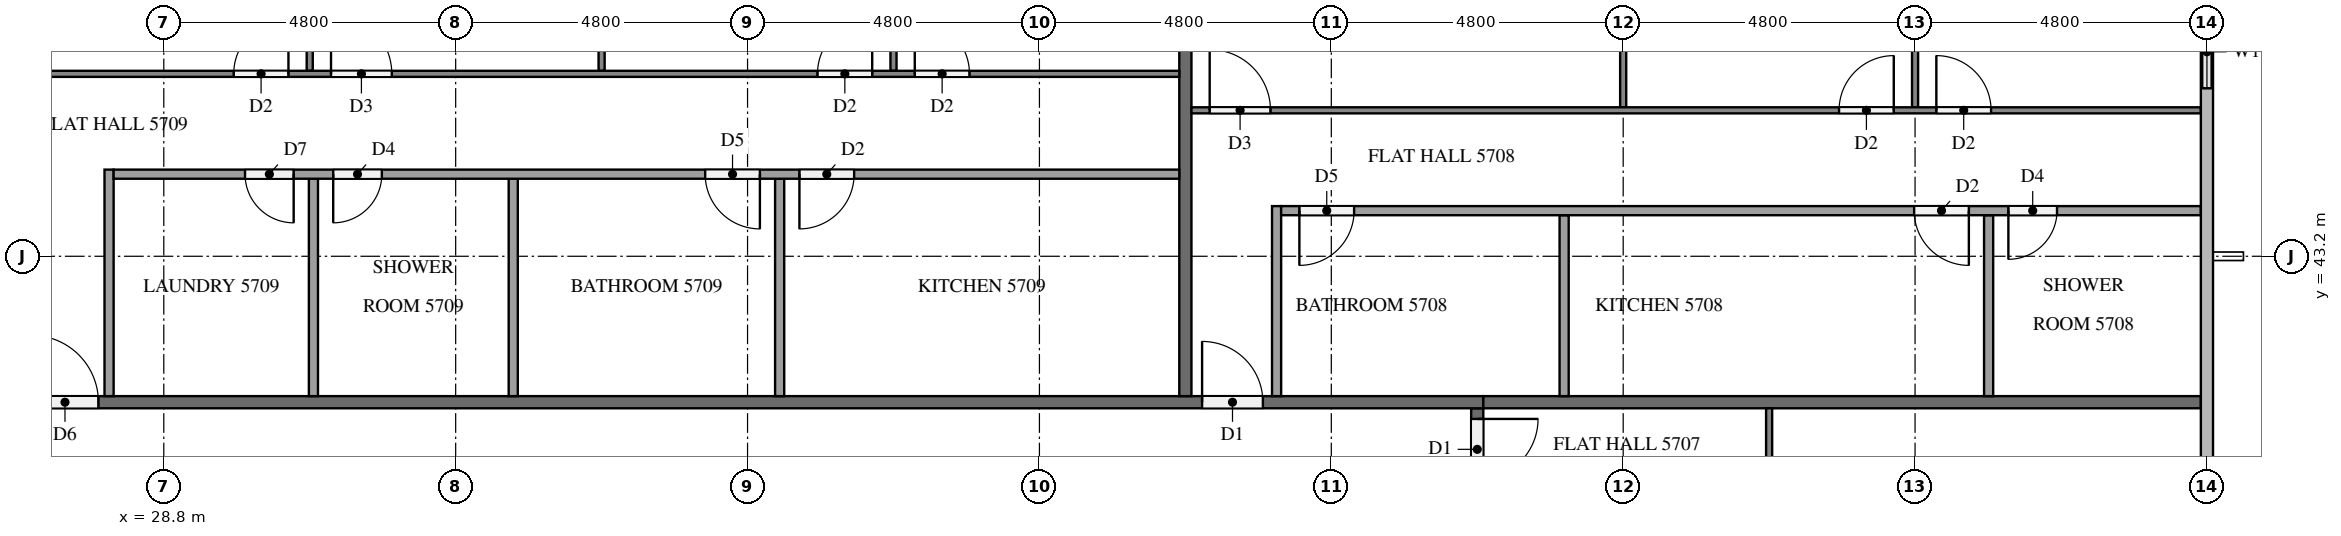
"""IFC4 building model, lengths in metres.
Left out: names, types, materials, properties, quantities, classifications, styles, units other than length and angle.
Written with IfcOpenShell. Run it as: python <this file> out.ifc"""

import sys

from ifc_helpers import new_model, si_unit, direction, frame, frame_2d, origin, place, context, subcontext, project, spatial, rectangle, extrude, element, fill, save


model = new_model("IFC4")
c1 = context("Model", 3, precision=1e-05, world=origin(), true_north=direction((0.0, 1.0)))
c2 = subcontext(c1, "Body", "Model", "MODEL_VIEW")
j1 = project(units=[si_unit("LENGTHUNIT", "METRE"), si_unit("PLANEANGLEUNIT", "RADIAN")], contexts=[c1])
p1 = place(None, origin())
s1 = spatial("IfcSite", under=j1, at=p1, CompositionType="ELEMENT")
p2 = place(p1, origin())
s2 = spatial("IfcBuilding", under=s1, at=p2, CompositionType="ELEMENT")
p3 = place(p2, frame((0.0, 0.0, 219.3)))
s3 = spatial("IfcBuildingStorey", under=s2, at=p3, CompositionType="ELEMENT", Elevation=219.3)
p4 = place(p3, frame((62.4, 45.6, 0.0), z_axis=(0.0, 0.0, 1.0), x_axis=(0.0, 1.0, 0.0)))
e1 = element("IfcWall", 1, at=p4, inside=s3, PredefinedType="SOLIDWALL", context=c2, shape_type="SweptSolid", body=[
    extrude(rectangle(XDim=1.925, YDim=0.15, at=frame_2d((0.962, 0.0))), origin(), (0.0, 0.0, 1.0), 3.2),
])
p5 = place(p4, frame((0.363, 0.0, 0.9)))
e2 = element("IfcOpeningElement", 2, at=p5, cuts=e1, PredefinedType="OPENING", context=c2, shape_type="SweptSolid", body=[
    extrude(rectangle(XDim=1.2, YDim=1.4, at=frame_2d((0.6, 0.7))), frame((0.0, 0.085, 0.0), z_axis=(0.0, -1.0, 0.0), x_axis=(1.0, 0.0, 0.0)), (0.0, 0.0, 1.0), 0.17),
])
p6 = place(p3, frame((50.4, 40.7, 0.0), z_axis=(0.0, 0.0, 1.0), x_axis=(0.0, -1.0, 0.0)))
e3 = element("IfcWall", 3, at=p6, inside=s3, PredefinedType="PARTITIONING", context=c2, shape_type="SweptSolid", body=[
    extrude(rectangle(XDim=28.6, YDim=0.2, at=frame_2d((14.3, 0.0))), origin(), (0.0, 0.0, 1.0), 3.2),
])
p7 = place(p6, frame((21.775, 0.0, 0.0)))
e4 = element("IfcOpeningElement", 4, at=p7, cuts=e3, PredefinedType="OPENING", context=c2, shape_type="SweptSolid", body=[
    extrude(rectangle(XDim=1.0, YDim=2.1, at=frame_2d((0.5, 1.05))), frame((0.0, 0.11, 0.0), z_axis=(0.0, -1.0, 0.0), x_axis=(1.0, 0.0, 0.0)), (0.0, 0.0, 1.0), 0.22),
])
p8 = place(p6, frame((7.375, 0.0, 0.0)))
e5 = element("IfcOpeningElement", 5, at=p8, cuts=e3, PredefinedType="OPENING", context=c2, shape_type="SweptSolid", body=[
    extrude(rectangle(XDim=1.0, YDim=2.1, at=frame_2d((0.5, 1.05))), frame((0.0, 0.11, 0.0), z_axis=(0.0, -1.0, 0.0), x_axis=(1.0, 0.0, 0.0)), (0.0, 0.0, 1.0), 0.22),
])
p9 = place(p6, frame((0.175, 0.0, 0.0)))
e6 = element("IfcOpeningElement", 6, at=p9, cuts=e3, PredefinedType="OPENING", context=c2, shape_type="SweptSolid", body=[
    extrude(rectangle(XDim=1.0, YDim=2.1, at=frame_2d((0.5, 1.05))), frame((0.0, 0.11, 0.0), z_axis=(0.0, -1.0, 0.0), x_axis=(1.0, 0.0, 0.0)), (0.0, 0.0, 1.0), 0.22),
])
p10 = place(p3, frame((11.9, 40.8, 0.0), z_axis=(0.0, 0.0, 1.0), x_axis=(1.0, 0.0, 0.0)))
e7 = element("IfcWall", 7, at=p10, inside=s3, PredefinedType="PARTITIONING", context=c2, shape_type="SweptSolid", body=[
    extrude(rectangle(XDim=38.6, YDim=0.2, at=frame_2d((19.3, 0.0))), origin(), (0.0, 0.0, 1.0), 3.2),
])
p11 = place(p10, frame((33.975, 0.0, 0.0)))
e8 = element("IfcOpeningElement", 8, at=p11, cuts=e7, PredefinedType="OPENING", context=c2, shape_type="SweptSolid", body=[
    extrude(rectangle(XDim=1.0, YDim=2.1, at=frame_2d((0.5, 1.05))), frame((0.0, 0.11, 0.0), z_axis=(0.0, -1.0, 0.0), x_axis=(1.0, 0.0, 0.0)), (0.0, 0.0, 1.0), 0.22),
])
p12 = place(p10, frame((14.725, 0.0, 0.0)))
e9 = element("IfcOpeningElement", 9, at=p12, cuts=e7, PredefinedType="OPENING", context=c2, shape_type="SweptSolid", body=[
    extrude(rectangle(XDim=1.1, YDim=2.1, at=frame_2d((0.55, 1.05))), frame((0.0, 0.11, 0.0), z_axis=(0.0, -1.0, 0.0), x_axis=(1.0, 0.0, 0.0)), (0.0, 0.0, 1.0), 0.22),
])
p13 = place(p10, frame((7.575, 0.0, 0.0)))
e10 = element("IfcOpeningElement", 10, at=p13, cuts=e7, PredefinedType="OPENING", context=c2, shape_type="SweptSolid", body=[
    extrude(rectangle(XDim=1.0, YDim=2.1, at=frame_2d((0.5, 1.05))), frame((0.0, 0.11, 0.0), z_axis=(0.0, -1.0, 0.0), x_axis=(1.0, 0.0, 0.0)), (0.0, 0.0, 1.0), 0.22),
])
p14 = place(p10, frame((6.025, 0.0, 0.0)))
e11 = element("IfcOpeningElement", 11, at=p14, cuts=e7, PredefinedType="OPENING", context=c2, shape_type="SweptSolid", body=[
    extrude(rectangle(XDim=1.0, YDim=2.1, at=frame_2d((0.5, 1.05))), frame((0.0, 0.11, 0.0), z_axis=(0.0, -1.0, 0.0), x_axis=(1.0, 0.0, 0.0)), (0.0, 0.0, 1.0), 0.22),
])
for number, where, z_axis, x_axis in (
    (12, (50.5, 40.8, 0.0), (0.0, 0.0, 1.0), (1.0, 0.0, 0.0)),
    (13, (45.6, 52.7, 0.0), (0.0, 0.0, 1.0), (0.0, -1.0, 0.0)),
):
    element("IfcWall", number, at=place(p3, frame(where, z_axis=z_axis, x_axis=x_axis)), inside=s3, PredefinedType="PARTITIONING", context=c2, shape_type="SweptSolid", body=[
        extrude(rectangle(XDim=11.8, YDim=0.2, at=frame_2d((5.9, 0.0))), origin(), (0.0, 0.0, 1.0), 3.2),
    ])
p15 = place(p3, frame((55.2, 40.7, 0.0), z_axis=(0.0, 0.0, 1.0), x_axis=(0.0, -1.0, 0.0)))
e14 = element("IfcWall", 14, at=p15, inside=s3, PredefinedType="PARTITIONING", context=c2, shape_type="SweptSolid", body=[
    extrude(rectangle(XDim=7.0, YDim=0.1, at=frame_2d((3.5, 0.0))), origin(), (0.0, 0.0, 1.0), 3.2),
])
p16 = place(p15, frame((5.7, 0.0, 0.0)))
e15 = element("IfcOpeningElement", 15, at=p16, cuts=e14, PredefinedType="OPENING", context=c2, shape_type="SweptSolid", body=[
    extrude(rectangle(XDim=1.0, YDim=2.1, at=frame_2d((0.5, 1.05))), frame((0.0, 0.06, 0.0), z_axis=(0.0, -1.0, 0.0), x_axis=(1.0, 0.0, 0.0)), (0.0, 0.0, 1.0), 0.12),
])
p17 = place(p3, frame((52.8, 45.65, 0.0), z_axis=(0.0, 0.0, 1.0), x_axis=(0.0, 1.0, 0.0)))
e16 = element("IfcWall", 16, at=p17, inside=s3, PredefinedType="PARTITIONING", context=c2, shape_type="SweptSolid", body=[
    extrude(rectangle(XDim=7.05, YDim=0.1, at=frame_2d((3.525, 0.0))), origin(), (0.0, 0.0, 1.0), 3.2),
])
p18 = place(p3, frame((57.6, 45.65, 0.0), z_axis=(0.0, 0.0, 1.0), x_axis=(0.0, 1.0, 0.0)))
e17 = element("IfcWall", 17, at=p18, inside=s3, PredefinedType="PARTITIONING", context=c2, shape_type="SweptSolid", body=[
    extrude(rectangle(XDim=6.675, YDim=0.1, at=frame_2d((3.337, 0.0))), origin(), (0.0, 0.0, 1.0), 3.2),
])
p19 = place(p3, frame((45.7, 45.6, 0.0), z_axis=(0.0, 0.0, 1.0), x_axis=(1.0, 0.0, 0.0)))
e18 = element("IfcWall", 18, at=p19, inside=s3, PredefinedType="PARTITIONING", context=c2, shape_type="SweptSolid", body=[
    extrude(rectangle(XDim=16.6, YDim=0.1, at=frame_2d((8.3, 0.0))), origin(), (0.0, 0.0, 1.0), 3.2),
])
p20 = place(p19, frame((0.3, 0.0, 0.0)))
e19 = element("IfcOpeningElement", 19, at=p20, cuts=e18, PredefinedType="OPENING", context=c2, shape_type="SweptSolid", body=[
    extrude(rectangle(XDim=1.0, YDim=2.1, at=frame_2d((0.5, 1.05))), frame((0.0, 0.06, 0.0), z_axis=(0.0, -1.0, 0.0), x_axis=(1.0, 0.0, 0.0)), (0.0, 0.0, 1.0), 0.12),
])
p21 = place(p19, frame((10.65, 0.0, 0.0)))
e20 = element("IfcOpeningElement", 20, at=p21, cuts=e18, PredefinedType="OPENING", context=c2, shape_type="SweptSolid", body=[
    extrude(rectangle(XDim=0.9, YDim=2.1, at=frame_2d((0.45, 1.05))), frame((0.0, 0.06, 0.0), z_axis=(0.0, -1.0, 0.0), x_axis=(1.0, 0.0, 0.0)), (0.0, 0.0, 1.0), 0.12),
])
p22 = place(p19, frame((12.25, 0.0, 0.0)))
e21 = element("IfcOpeningElement", 21, at=p22, cuts=e18, PredefinedType="OPENING", context=c2, shape_type="SweptSolid", body=[
    extrude(rectangle(XDim=0.9, YDim=2.1, at=frame_2d((0.45, 1.05))), frame((0.0, 0.06, 0.0), z_axis=(0.0, -1.0, 0.0), x_axis=(1.0, 0.0, 0.0)), (0.0, 0.0, 1.0), 0.12),
])
for number, where, z_axis, x_axis in (
    (22, (51.829, 40.9, 0.0), (0.0, 0.0, 1.0), (0.0, 1.0, 0.0)),
    (23, (58.81, 40.9, 0.0), (0.0, 0.0, 1.0), (0.0, 1.0, 0.0)),
):
    element("IfcWall", number, at=place(p3, frame(where, z_axis=z_axis, x_axis=x_axis)), inside=s3, PredefinedType="PARTITIONING", context=c2, shape_type="SweptSolid", body=[
        extrude(rectangle(XDim=2.975, YDim=0.15, at=frame_2d((1.488, 0.0))), origin(), (0.0, 0.0, 1.0), 3.2),
    ])
p23 = place(p3, frame((47.1, 40.9, 0.0), z_axis=(0.0, 0.0, 1.0), x_axis=(0.0, 1.0, 0.0)))
e24 = element("IfcWall", 24, at=p23, inside=s3, PredefinedType="PARTITIONING", context=c2, shape_type="SweptSolid", body=[
    extrude(rectangle(XDim=3.125, YDim=0.15, at=frame_2d((1.562, 0.0))), origin(), (0.0, 0.0, 1.0), 3.2),
])
p24 = place(p3, frame((62.3, 43.95, 0.0), z_axis=(0.0, 0.0, 1.0), x_axis=(-1.0, 0.0, 0.0)))
e25 = element("IfcWall", 25, at=p24, inside=s3, PredefinedType="PARTITIONING", context=c2, shape_type="SweptSolid", body=[
    extrude(rectangle(XDim=15.125, YDim=0.15, at=frame_2d((7.562, 0.0))), origin(), (0.0, 0.0, 1.0), 3.2),
])
p25 = place(p24, frame((13.925, 0.0, 0.0)))
e26 = element("IfcOpeningElement", 26, at=p25, cuts=e25, PredefinedType="OPENING", context=c2, shape_type="SweptSolid", body=[
    extrude(rectangle(XDim=0.9, YDim=2.1, at=frame_2d((0.45, 1.05))), frame((0.0, 0.085, 0.0), z_axis=(0.0, -1.0, 0.0), x_axis=(1.0, 0.0, 0.0)), (0.0, 0.0, 1.0), 0.17),
])
p26 = place(p24, frame((3.815, 0.0, 0.0)))
e27 = element("IfcOpeningElement", 27, at=p26, cuts=e25, PredefinedType="OPENING", context=c2, shape_type="SweptSolid", body=[
    extrude(rectangle(XDim=0.9, YDim=2.1, at=frame_2d((0.45, 1.05))), frame((0.0, 0.085, 0.0), z_axis=(0.0, -1.0, 0.0), x_axis=(1.0, 0.0, 0.0)), (0.0, 0.0, 1.0), 0.17),
])
p27 = place(p24, frame((2.365, 0.0, 0.0)))
e28 = element("IfcOpeningElement", 28, at=p27, cuts=e25, PredefinedType="OPENING", context=c2, shape_type="SweptSolid", body=[
    extrude(rectangle(XDim=0.8, YDim=2.1, at=frame_2d((0.4, 1.05))), frame((0.0, 0.085, 0.0), z_axis=(0.0, -1.0, 0.0), x_axis=(1.0, 0.0, 0.0)), (0.0, 0.0, 1.0), 0.17),
])
for number, where, z_axis, x_axis in (
    (29, (31.2, 46.25, 0.0), (0.0, 0.0, 1.0), (0.0, 1.0, 0.0)),
    (30, (36.0, 46.25, 0.0), (0.0, 0.0, 1.0), (0.0, 1.0, 0.0)),
    (31, (40.8, 46.25, 0.0), (0.0, 0.0, 1.0), (0.0, 1.0, 0.0)),
):
    element("IfcWall", number, at=place(p3, frame(where, z_axis=z_axis, x_axis=x_axis)), inside=s3, PredefinedType="PARTITIONING", context=c2, shape_type="SweptSolid", body=[
        extrude(rectangle(XDim=6.45, YDim=0.1, at=frame_2d((3.225, 0.0))), origin(), (0.0, 0.0, 1.0), 3.2),
    ])
p28 = place(p3, frame((26.5, 46.2, 0.0), z_axis=(0.0, 0.0, 1.0), x_axis=(1.0, 0.0, 0.0)))
e32 = element("IfcWall", 32, at=p28, inside=s3, PredefinedType="PARTITIONING", context=c2, shape_type="SweptSolid", body=[
    extrude(rectangle(XDim=19.0, YDim=0.1, at=frame_2d((9.5, 0.0))), origin(), (0.0, 0.0, 1.0), 3.2),
])
p29 = place(p28, frame((3.45, 0.0, 0.0)))
e33 = element("IfcOpeningElement", 33, at=p29, cuts=e32, PredefinedType="OPENING", context=c2, shape_type="SweptSolid", body=[
    extrude(rectangle(XDim=0.9, YDim=2.1, at=frame_2d((0.45, 1.05))), frame((0.0, 0.06, 0.0), z_axis=(0.0, -1.0, 0.0), x_axis=(1.0, 0.0, 0.0)), (0.0, 0.0, 1.0), 0.12),
])
p30 = place(p28, frame((5.05, 0.0, 0.0)))
e34 = element("IfcOpeningElement", 34, at=p30, cuts=e32, PredefinedType="OPENING", context=c2, shape_type="SweptSolid", body=[
    extrude(rectangle(XDim=1.0, YDim=2.1, at=frame_2d((0.5, 1.05))), frame((0.0, 0.06, 0.0), z_axis=(0.0, -1.0, 0.0), x_axis=(1.0, 0.0, 0.0)), (0.0, 0.0, 1.0), 0.12),
])
p31 = place(p28, frame((13.05, 0.0, 0.0)))
e35 = element("IfcOpeningElement", 35, at=p31, cuts=e32, PredefinedType="OPENING", context=c2, shape_type="SweptSolid", body=[
    extrude(rectangle(XDim=0.9, YDim=2.1, at=frame_2d((0.45, 1.05))), frame((0.0, 0.06, 0.0), z_axis=(0.0, -1.0, 0.0), x_axis=(1.0, 0.0, 0.0)), (0.0, 0.0, 1.0), 0.12),
])
p32 = place(p28, frame((14.65, 0.0, 0.0)))
e36 = element("IfcOpeningElement", 36, at=p32, cuts=e32, PredefinedType="OPENING", context=c2, shape_type="SweptSolid", body=[
    extrude(rectangle(XDim=0.9, YDim=2.1, at=frame_2d((0.45, 1.05))), frame((0.0, 0.06, 0.0), z_axis=(0.0, -1.0, 0.0), x_axis=(1.0, 0.0, 0.0)), (0.0, 0.0, 1.0), 0.12),
])
for number, where, z_axis, x_axis in (
    (37, (31.261, 40.9, 0.0), (0.0, 0.0, 1.0), (0.0, 1.0, 0.0)),
    (38, (34.547, 40.9, 0.0), (0.0, 0.0, 1.0), (0.0, 1.0, 0.0)),
    (39, (38.928, 40.9, 0.0), (0.0, 0.0, 1.0), (0.0, 1.0, 0.0)),
):
    element("IfcWall", number, at=place(p3, frame(where, z_axis=z_axis, x_axis=x_axis)), inside=s3, PredefinedType="PARTITIONING", context=c2, shape_type="SweptSolid", body=[
        extrude(rectangle(XDim=3.575, YDim=0.15, at=frame_2d((1.788, 0.0))), origin(), (0.0, 0.0, 1.0), 3.2),
    ])
p33 = place(p3, frame((27.9, 40.9, 0.0), z_axis=(0.0, 0.0, 1.0), x_axis=(0.0, 1.0, 0.0)))
e40 = element("IfcWall", 40, at=p33, inside=s3, PredefinedType="PARTITIONING", context=c2, shape_type="SweptSolid", body=[
    extrude(rectangle(XDim=3.725, YDim=0.15, at=frame_2d((1.863, 0.0))), origin(), (0.0, 0.0, 1.0), 3.2),
])
p34 = place(p3, frame((45.5, 44.55, 0.0), z_axis=(0.0, 0.0, 1.0), x_axis=(-1.0, 0.0, 0.0)))
e41 = element("IfcWall", 41, at=p34, inside=s3, PredefinedType="PARTITIONING", context=c2, shape_type="SweptSolid", body=[
    extrude(rectangle(XDim=17.525, YDim=0.15, at=frame_2d((8.762, 0.0))), origin(), (0.0, 0.0, 1.0), 3.2),
])
p35 = place(p34, frame((14.564, 0.0, 0.0)))
e42 = element("IfcOpeningElement", 42, at=p35, cuts=e41, PredefinedType="OPENING", context=c2, shape_type="SweptSolid", body=[
    extrude(rectangle(XDim=0.8, YDim=2.1, at=frame_2d((0.4, 1.05))), frame((0.0, 0.085, 0.0), z_axis=(0.0, -1.0, 0.0), x_axis=(1.0, 0.0, 0.0)), (0.0, 0.0, 1.0), 0.17),
])
p36 = place(p34, frame((13.114, 0.0, 0.0)))
e43 = element("IfcOpeningElement", 43, at=p36, cuts=e41, PredefinedType="OPENING", context=c2, shape_type="SweptSolid", body=[
    extrude(rectangle(XDim=0.8, YDim=2.1, at=frame_2d((0.4, 1.05))), frame((0.0, 0.085, 0.0), z_axis=(0.0, -1.0, 0.0), x_axis=(1.0, 0.0, 0.0)), (0.0, 0.0, 1.0), 0.17),
])
p37 = place(p34, frame((6.897, 0.0, 0.0)))
e44 = element("IfcOpeningElement", 44, at=p37, cuts=e41, PredefinedType="OPENING", context=c2, shape_type="SweptSolid", body=[
    extrude(rectangle(XDim=0.9, YDim=2.1, at=frame_2d((0.45, 1.05))), frame((0.0, 0.085, 0.0), z_axis=(0.0, -1.0, 0.0), x_axis=(1.0, 0.0, 0.0)), (0.0, 0.0, 1.0), 0.17),
])
p38 = place(p34, frame((5.347, 0.0, 0.0)))
e45 = element("IfcOpeningElement", 45, at=p38, cuts=e41, PredefinedType="OPENING", context=c2, shape_type="SweptSolid", body=[
    extrude(rectangle(XDim=0.9, YDim=2.1, at=frame_2d((0.45, 1.05))), frame((0.0, 0.085, 0.0), z_axis=(0.0, -1.0, 0.0), x_axis=(1.0, 0.0, 0.0)), (0.0, 0.0, 1.0), 0.17),
])
p39 = place(p5, origin())
e46 = element("IfcWindow", 46, at=p39, inside=s3, PartitioningType="SINGLE_PANEL", PredefinedType="WINDOW", context=c2, shape_type="SweptSolid", body=[
    extrude(rectangle(XDim=1.2, YDim=1.4, at=frame_2d((0.6, 0.7))), frame((0.0, 0.03, 0.0), z_axis=(0.0, -1.0, 0.0), x_axis=(1.0, 0.0, 0.0)), (0.0, 0.0, 1.0), 0.06),
])
fill(e2, e46)
p40 = place(p9, origin())
e47 = element("IfcDoor", 47, at=p40, inside=s3, OperationType="SINGLE_SWING_LEFT", PredefinedType="DOOR", context=c2, shape_type="SweptSolid", body=[
    extrude(rectangle(XDim=1.0, YDim=2.1, at=frame_2d((0.5, 1.05))), frame((0.0, 0.025, 0.0), z_axis=(0.0, -1.0, 0.0), x_axis=(1.0, 0.0, 0.0)), (0.0, 0.0, 1.0), 0.05),
])
fill(e6, e47)
p41 = place(p11, origin())
e48 = element("IfcDoor", 48, at=p41, inside=s3, OperationType="SINGLE_SWING_LEFT", PredefinedType="DOOR", context=c2, shape_type="SweptSolid", body=[
    extrude(rectangle(XDim=1.0, YDim=2.1, at=frame_2d((0.5, 1.05))), frame((0.0, 0.025, 0.0), z_axis=(0.0, -1.0, 0.0), x_axis=(1.0, 0.0, 0.0)), (0.0, 0.0, 1.0), 0.05),
])
fill(e8, e48)
p42 = place(p12, origin())
e49 = element("IfcDoor", 49, at=p42, inside=s3, OperationType="SINGLE_SWING_LEFT", PredefinedType="DOOR", context=c2, shape_type="SweptSolid", body=[
    extrude(rectangle(XDim=1.1, YDim=2.1, at=frame_2d((0.55, 1.05))), frame((0.0, 0.025, 0.0), z_axis=(0.0, -1.0, 0.0), x_axis=(1.0, 0.0, 0.0)), (0.0, 0.0, 1.0), 0.05),
])
fill(e9, e49)
p43 = place(p20, origin())
e50 = element("IfcDoor", 50, at=p43, inside=s3, OperationType="SINGLE_SWING_LEFT", PredefinedType="DOOR", context=c2, shape_type="SweptSolid", body=[
    extrude(rectangle(XDim=1.0, YDim=2.1, at=frame_2d((0.5, 1.05))), frame((0.0, 0.025, 0.0), z_axis=(0.0, -1.0, 0.0), x_axis=(1.0, 0.0, 0.0)), (0.0, 0.0, 1.0), 0.05),
])
fill(e19, e50)
p44 = place(p21, origin())
e51 = element("IfcDoor", 51, at=p44, inside=s3, OperationType="SINGLE_SWING_RIGHT", PredefinedType="DOOR", context=c2, shape_type="SweptSolid", body=[
    extrude(rectangle(XDim=0.9, YDim=2.1, at=frame_2d((0.45, 1.05))), frame((0.0, 0.025, 0.0), z_axis=(0.0, -1.0, 0.0), x_axis=(1.0, 0.0, 0.0)), (0.0, 0.0, 1.0), 0.05),
])
fill(e20, e51)
p45 = place(p22, origin())
e52 = element("IfcDoor", 52, at=p45, inside=s3, OperationType="SINGLE_SWING_LEFT", PredefinedType="DOOR", context=c2, shape_type="SweptSolid", body=[
    extrude(rectangle(XDim=0.9, YDim=2.1, at=frame_2d((0.45, 1.05))), frame((0.0, 0.025, 0.0), z_axis=(0.0, -1.0, 0.0), x_axis=(1.0, 0.0, 0.0)), (0.0, 0.0, 1.0), 0.05),
])
fill(e21, e52)
p46 = place(p25, origin())
e53 = element("IfcDoor", 53, at=p46, inside=s3, OperationType="SINGLE_SWING_RIGHT", PredefinedType="DOOR", context=c2, shape_type="SweptSolid", body=[
    extrude(rectangle(XDim=0.9, YDim=2.1, at=frame_2d((0.45, 1.05))), frame((0.0, 0.025, 0.0), z_axis=(0.0, -1.0, 0.0), x_axis=(1.0, 0.0, 0.0)), (0.0, 0.0, 1.0), 0.05),
])
fill(e26, e53)
p47 = place(p26, origin())
e54 = element("IfcDoor", 54, at=p47, inside=s3, OperationType="SINGLE_SWING_LEFT", PredefinedType="DOOR", context=c2, shape_type="SweptSolid", body=[
    extrude(rectangle(XDim=0.9, YDim=2.1, at=frame_2d((0.45, 1.05))), frame((0.0, 0.025, 0.0), z_axis=(0.0, -1.0, 0.0), x_axis=(1.0, 0.0, 0.0)), (0.0, 0.0, 1.0), 0.05),
])
fill(e27, e54)
p48 = place(p27, origin())
e55 = element("IfcDoor", 55, at=p48, inside=s3, OperationType="SINGLE_SWING_RIGHT", PredefinedType="DOOR", context=c2, shape_type="SweptSolid", body=[
    extrude(rectangle(XDim=0.8, YDim=2.1, at=frame_2d((0.4, 1.05))), frame((0.0, 0.025, 0.0), z_axis=(0.0, -1.0, 0.0), x_axis=(1.0, 0.0, 0.0)), (0.0, 0.0, 1.0), 0.05),
])
fill(e28, e55)
p49 = place(p29, origin())
e56 = element("IfcDoor", 56, at=p49, inside=s3, OperationType="SINGLE_SWING_RIGHT", PredefinedType="DOOR", context=c2, shape_type="SweptSolid", body=[
    extrude(rectangle(XDim=0.9, YDim=2.1, at=frame_2d((0.45, 1.05))), frame((0.0, 0.025, 0.0), z_axis=(0.0, -1.0, 0.0), x_axis=(1.0, 0.0, 0.0)), (0.0, 0.0, 1.0), 0.05),
])
fill(e33, e56)
p50 = place(p30, origin())
e57 = element("IfcDoor", 57, at=p50, inside=s3, OperationType="SINGLE_SWING_LEFT", PredefinedType="DOOR", context=c2, shape_type="SweptSolid", body=[
    extrude(rectangle(XDim=1.0, YDim=2.1, at=frame_2d((0.5, 1.05))), frame((0.0, 0.025, 0.0), z_axis=(0.0, -1.0, 0.0), x_axis=(1.0, 0.0, 0.0)), (0.0, 0.0, 1.0), 0.05),
])
fill(e34, e57)
p51 = place(p31, origin())
e58 = element("IfcDoor", 58, at=p51, inside=s3, OperationType="SINGLE_SWING_RIGHT", PredefinedType="DOOR", context=c2, shape_type="SweptSolid", body=[
    extrude(rectangle(XDim=0.9, YDim=2.1, at=frame_2d((0.45, 1.05))), frame((0.0, 0.025, 0.0), z_axis=(0.0, -1.0, 0.0), x_axis=(1.0, 0.0, 0.0)), (0.0, 0.0, 1.0), 0.05),
])
fill(e35, e58)
p52 = place(p32, origin())
e59 = element("IfcDoor", 59, at=p52, inside=s3, OperationType="SINGLE_SWING_LEFT", PredefinedType="DOOR", context=c2, shape_type="SweptSolid", body=[
    extrude(rectangle(XDim=0.9, YDim=2.1, at=frame_2d((0.45, 1.05))), frame((0.0, 0.025, 0.0), z_axis=(0.0, -1.0, 0.0), x_axis=(1.0, 0.0, 0.0)), (0.0, 0.0, 1.0), 0.05),
])
fill(e36, e59)
p53 = place(p35, origin())
e60 = element("IfcDoor", 60, at=p53, inside=s3, OperationType="SINGLE_SWING_LEFT", PredefinedType="DOOR", context=c2, shape_type="SweptSolid", body=[
    extrude(rectangle(XDim=0.8, YDim=2.1, at=frame_2d((0.4, 1.05))), frame((0.0, 0.025, 0.0), z_axis=(0.0, -1.0, 0.0), x_axis=(1.0, 0.0, 0.0)), (0.0, 0.0, 1.0), 0.05),
])
fill(e42, e60)
p54 = place(p36, origin())
e61 = element("IfcDoor", 61, at=p54, inside=s3, OperationType="SINGLE_SWING_RIGHT", PredefinedType="DOOR", context=c2, shape_type="SweptSolid", body=[
    extrude(rectangle(XDim=0.8, YDim=2.1, at=frame_2d((0.4, 1.05))), frame((0.0, 0.025, 0.0), z_axis=(0.0, -1.0, 0.0), x_axis=(1.0, 0.0, 0.0)), (0.0, 0.0, 1.0), 0.05),
])
fill(e43, e61)
p55 = place(p37, origin())
e62 = element("IfcDoor", 62, at=p55, inside=s3, OperationType="SINGLE_SWING_LEFT", PredefinedType="DOOR", context=c2, shape_type="SweptSolid", body=[
    extrude(rectangle(XDim=0.9, YDim=2.1, at=frame_2d((0.45, 1.05))), frame((0.0, 0.025, 0.0), z_axis=(0.0, -1.0, 0.0), x_axis=(1.0, 0.0, 0.0)), (0.0, 0.0, 1.0), 0.05),
])
fill(e44, e62)
p56 = place(p38, origin())
e63 = element("IfcDoor", 63, at=p56, inside=s3, OperationType="SINGLE_SWING_RIGHT", PredefinedType="DOOR", context=c2, shape_type="SweptSolid", body=[
    extrude(rectangle(XDim=0.9, YDim=2.1, at=frame_2d((0.45, 1.05))), frame((0.0, 0.025, 0.0), z_axis=(0.0, -1.0, 0.0), x_axis=(1.0, 0.0, 0.0)), (0.0, 0.0, 1.0), 0.05),
])
fill(e45, e63)
save(model, sys.argv[1])
